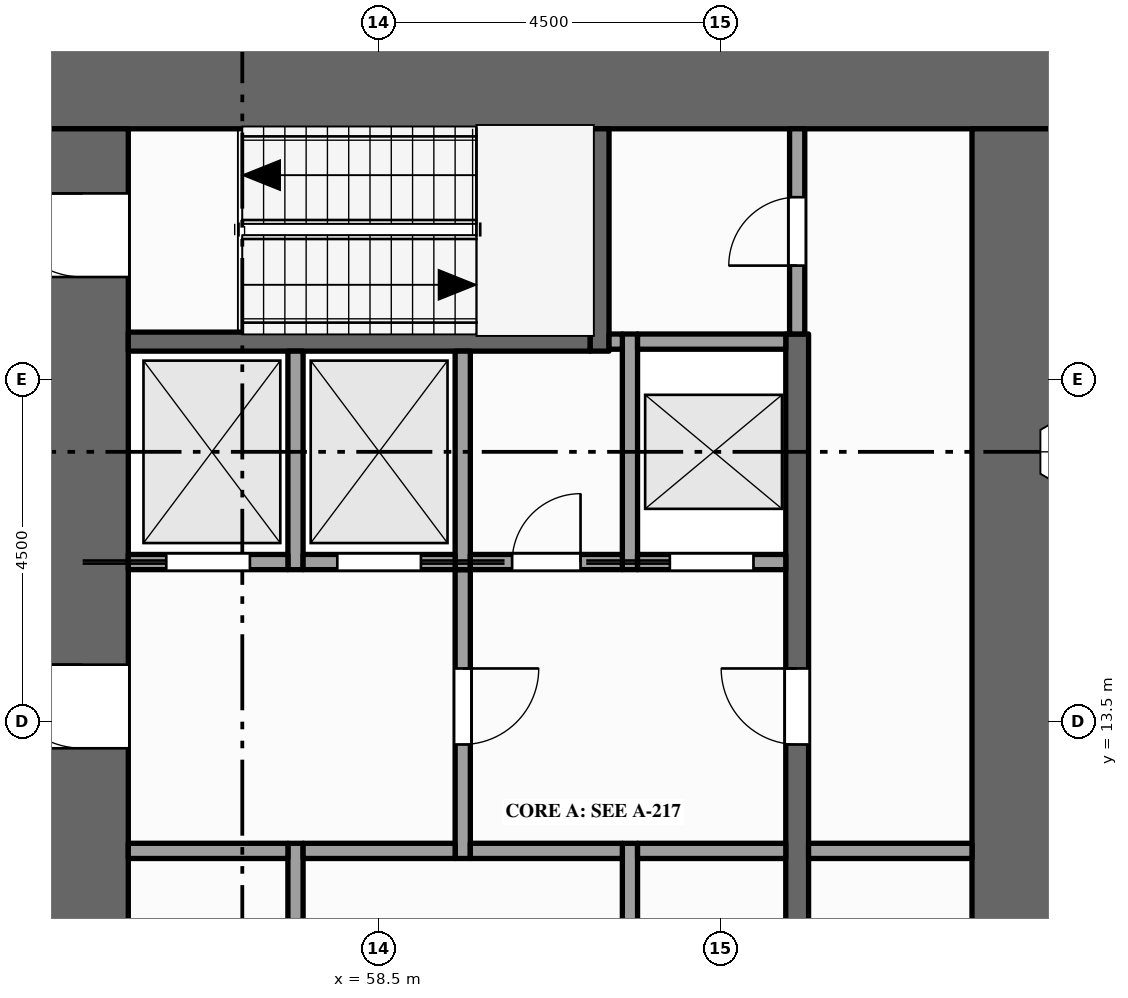
"""IFC4 building model, lengths in metres.
Left out: names, types, materials, properties, quantities, classifications, styles, units other than length and angle.
Written with IfcOpenShell. Run it as: python <this file> out.ifc"""

import sys

from ifc_helpers import new_model, si_unit, direction, frame, frame_2d, origin, place, context, subcontext, project, spatial, rectangle, extrude, element, fill, save


model = new_model("IFC4")
c1 = context("Model", 3, precision=1e-05, world=origin(), true_north=direction((0.0, 1.0)))
c2 = subcontext(c1, "Body", "Model", "MODEL_VIEW")
j1 = project(units=[si_unit("LENGTHUNIT", "METRE"), si_unit("PLANEANGLEUNIT", "RADIAN")], contexts=[c1])
p1 = place(None, origin())
s1 = spatial("IfcSite", under=j1, at=p1, CompositionType="ELEMENT")
p2 = place(p1, origin())
s2 = spatial("IfcBuilding", under=s1, at=p2, CompositionType="ELEMENT")
p3 = place(p2, frame((0.0, 0.0, 95.0)))
s3 = spatial("IfcBuildingStorey", under=s2, at=p3, CompositionType="ELEMENT", Elevation=95.0)
p4 = place(p3, frame((54.0, 21.9, -0.15), z_axis=(0.0, 0.0, 1.0), x_axis=(1.0, 0.0, 0.0)))
e1 = element("IfcWall", 1, at=p4, inside=s3, PredefinedType="SHEAR", context=c2, shape_type="SweptSolid", body=[
    extrude(rectangle(XDim=13.5, YDim=1.2, at=frame_2d((6.75, 0.0))), origin(), (0.0, 0.0, 1.0), 4.0),
])
p5 = place(p3, frame((54.6, 1.2, -0.15), z_axis=(0.0, 0.0, 1.0), x_axis=(0.0, 1.0, 0.0)))
e2 = element("IfcWall", 2, at=p5, inside=s3, PredefinedType="SHEAR", context=c2, shape_type="SweptSolid", body=[
    extrude(rectangle(XDim=20.1, YDim=1.2, at=frame_2d((10.05, 0.0))), origin(), (0.0, 0.0, 1.0), 4.0),
])
p6 = place(p5, frame((5.9, 0.0, 0.15)))
e3 = element("IfcOpeningElement", 3, at=p6, cuts=e2, PredefinedType="OPENING", context=c2, shape_type="SweptSolid", body=[
    extrude(rectangle(XDim=1.8, YDim=2.1, at=frame_2d((0.9, 1.05))), frame((0.0, 0.61, 0.0), z_axis=(0.0, -1.0, 0.0), x_axis=(1.0, 0.0, 0.0)), (0.0, 0.0, 1.0), 1.22),
])
p7 = place(p5, frame((11.95, 0.0, 0.15)))
e4 = element("IfcOpeningElement", 4, at=p7, cuts=e2, PredefinedType="OPENING", context=c2, shape_type="SweptSolid", body=[
    extrude(rectangle(XDim=1.1, YDim=2.1, at=frame_2d((0.55, 1.05))), frame((0.0, 0.61, 0.0), z_axis=(0.0, -1.0, 0.0), x_axis=(1.0, 0.0, 0.0)), (0.0, 0.0, 1.0), 1.22),
])
p8 = place(p5, frame((0.95, 0.0, 0.15)))
e5 = element("IfcOpeningElement", 5, at=p8, cuts=e2, PredefinedType="OPENING", context=c2, shape_type="SweptSolid", body=[
    extrude(rectangle(XDim=1.1, YDim=2.1, at=frame_2d((0.55, 1.05))), frame((0.0, 0.61, 0.0), z_axis=(0.0, -1.0, 0.0), x_axis=(1.0, 0.0, 0.0)), (0.0, 0.0, 1.0), 1.22),
])
p9 = place(p5, frame((18.15, 0.0, 0.15)))
e6 = element("IfcOpeningElement", 6, at=p9, cuts=e2, PredefinedType="OPENING", context=c2, shape_type="SweptSolid", body=[
    extrude(rectangle(XDim=1.1, YDim=2.1, at=frame_2d((0.55, 1.05))), frame((0.0, 0.61, 0.0), z_axis=(0.0, -1.0, 0.0), x_axis=(1.0, 0.0, 0.0)), (0.0, 0.0, 1.0), 1.22),
])
p10 = place(p3, frame((66.9, 1.2, -0.15), z_axis=(0.0, 0.0, 1.0), x_axis=(0.0, 1.0, 0.0)))
e7 = element("IfcWall", 7, at=p10, inside=s3, PredefinedType="SHEAR", context=c2, shape_type="SweptSolid", body=[
    extrude(rectangle(XDim=20.1, YDim=1.2, at=frame_2d((10.05, 0.0))), origin(), (0.0, 0.0, 1.0), 4.0),
])
p11 = place(p3, frame((57.4, 9.3, 0.0), z_axis=(0.0, 0.0, 1.0), x_axis=(0.0, 1.0, 0.0)))
e8 = element("IfcWall", 8, at=p11, inside=s3, PredefinedType="PARTITIONING", context=c2, shape_type="SweptSolid", body=[
    extrude(rectangle(XDim=2.6, YDim=0.2, at=frame_2d((1.3, 0.0))), origin(), (0.0, 0.0, 1.0), 3.85),
])
p12 = place(p3, frame((57.4, 15.5, 0.0), z_axis=(0.0, 0.0, 1.0), x_axis=(0.0, 1.0, 0.0)))
e9 = element("IfcWall", 9, at=p12, inside=s3, PredefinedType="SOLIDWALL", context=c2, shape_type="SweptSolid", body=[
    extrude(rectangle(XDim=2.875, YDim=0.2, at=frame_2d((1.438, 0.0))), origin(), (0.0, 0.0, 1.0), 3.85),
])
p13 = place(p3, frame((59.6, 11.7, 0.0), z_axis=(0.0, 0.0, 1.0), x_axis=(0.0, 1.0, 0.0)))
e10 = element("IfcWall", 10, at=p13, inside=s3, PredefinedType="PARTITIONING", context=c2, shape_type="SweptSolid", body=[
    extrude(rectangle(XDim=3.8, YDim=0.2, at=frame_2d((1.9, 0.0))), origin(), (0.0, 0.0, 1.0), 3.85),
])
p14 = place(p13, frame((1.5, 0.0, 0.0)))
e11 = element("IfcOpeningElement", 11, at=p14, cuts=e10, PredefinedType="OPENING", context=c2, shape_type="SweptSolid", body=[
    extrude(rectangle(XDim=1.0, YDim=2.1, at=frame_2d((0.5, 1.05))), frame((0.0, 0.11, 0.0), z_axis=(0.0, -1.0, 0.0), x_axis=(1.0, 0.0, 0.0)), (0.0, 0.0, 1.0), 0.22),
])
p15 = place(p3, frame((59.6, 15.5, 0.0), z_axis=(0.0, 0.0, 1.0), x_axis=(0.0, 1.0, 0.0)))
e12 = element("IfcWall", 12, at=p15, inside=s3, PredefinedType="SOLIDWALL", context=c2, shape_type="SweptSolid", body=[
    extrude(rectangle(XDim=2.875, YDim=0.2, at=frame_2d((1.438, 0.0))), origin(), (0.0, 0.0, 1.0), 3.85),
])
p16 = place(p3, frame((61.4, 18.375, 0.0), z_axis=(0.0, 0.0, 1.0), x_axis=(0.0, 1.0, 0.0)))
e13 = element("IfcWall", 13, at=p16, inside=s3, PredefinedType="SHEAR", context=c2, shape_type="SweptSolid", body=[
    extrude(rectangle(XDim=2.925, YDim=0.25, at=frame_2d((1.462, 0.0))), origin(), (0.0, 0.0, 1.0), 3.85),
])
p17 = place(p3, frame((61.8, 9.3, 0.0), z_axis=(0.0, 0.0, 1.0), x_axis=(0.0, 1.0, 0.0)))
e14 = element("IfcWall", 14, at=p17, inside=s3, PredefinedType="PARTITIONING", context=c2, shape_type="SweptSolid", body=[
    extrude(rectangle(XDim=2.6, YDim=0.2, at=frame_2d((1.3, 0.0))), origin(), (0.0, 0.0, 1.0), 3.85),
])
p18 = place(p3, frame((61.8, 15.5, 0.0), z_axis=(0.0, 0.0, 1.0), x_axis=(0.0, 1.0, 0.0)))
e15 = element("IfcWall", 15, at=p18, inside=s3, PredefinedType="SOLIDWALL", context=c2, shape_type="SweptSolid", body=[
    extrude(rectangle(XDim=3.1, YDim=0.2, at=frame_2d((1.55, 0.0))), origin(), (0.0, 0.0, 1.0), 3.85),
])
p19 = place(p3, frame((64.0, 4.1, 0.0), z_axis=(0.0, 0.0, 1.0), x_axis=(0.0, 1.0, 0.0)))
e16 = element("IfcWall", 16, at=p19, inside=s3, PredefinedType="SHEAR", context=c2, shape_type="SweptSolid", body=[
    extrude(rectangle(XDim=14.5, YDim=0.3, at=frame_2d((7.25, 0.0))), origin(), (0.0, 0.0, 1.0), 3.85),
])
p20 = place(p19, frame((3.4, 0.0, 0.0)))
e17 = element("IfcOpeningElement", 17, at=p20, cuts=e16, PredefinedType="OPENING", context=c2, shape_type="SweptSolid", body=[
    extrude(rectangle(XDim=1.0, YDim=2.1, at=frame_2d((0.5, 1.05))), frame((0.0, 0.16, 0.0), z_axis=(0.0, -1.0, 0.0), x_axis=(1.0, 0.0, 0.0)), (0.0, 0.0, 1.0), 0.32),
])
p21 = place(p19, frame((9.1, 0.0, 0.0)))
e18 = element("IfcOpeningElement", 18, at=p21, cuts=e16, PredefinedType="OPENING", context=c2, shape_type="SweptSolid", body=[
    extrude(rectangle(XDim=1.0, YDim=2.1, at=frame_2d((0.5, 1.05))), frame((0.0, 0.16, 0.0), z_axis=(0.0, -1.0, 0.0), x_axis=(1.0, 0.0, 0.0)), (0.0, 0.0, 1.0), 0.32),
])
p22 = place(p3, frame((64.0, 18.6, 0.0), z_axis=(0.0, 0.0, 1.0), x_axis=(0.0, 1.0, 0.0)))
e19 = element("IfcWall", 19, at=p22, inside=s3, PredefinedType="PARTITIONING", context=c2, shape_type="SweptSolid", body=[
    extrude(rectangle(XDim=2.7, YDim=0.2, at=frame_2d((1.35, 0.0))), origin(), (0.0, 0.0, 1.0), 3.85),
])
p23 = place(p22, frame((0.9, 0.0, 0.0)))
e20 = element("IfcOpeningElement", 20, at=p23, cuts=e19, PredefinedType="OPENING", context=c2, shape_type="SweptSolid", body=[
    extrude(rectangle(XDim=0.9, YDim=2.1, at=frame_2d((0.45, 1.05))), frame((0.0, 0.11, 0.0), z_axis=(0.0, -1.0, 0.0), x_axis=(1.0, 0.0, 0.0)), (0.0, 0.0, 1.0), 0.22),
])
p24 = place(p3, frame((55.2, 11.8, 0.0), z_axis=(0.0, 0.0, 1.0), x_axis=(1.0, 0.0, 0.0)))
e21 = element("IfcWall", 21, at=p24, inside=s3, PredefinedType="PARTITIONING", context=c2, shape_type="SweptSolid", body=[
    extrude(rectangle(XDim=2.1, YDim=0.2, at=frame_2d((1.05, 0.0))), origin(), (0.0, 0.0, 1.0), 3.85),
])
for number, where, z_axis, x_axis in (
    (22, (57.5, 11.8, 0.0), (0.0, 0.0, 1.0), (1.0, 0.0, 0.0)),
    (23, (59.7, 11.8, 0.0), (0.0, 0.0, 1.0), (1.0, 0.0, 0.0)),
):
    element("IfcWall", number, at=place(p3, frame(where, z_axis=z_axis, x_axis=x_axis)), inside=s3, PredefinedType="PARTITIONING", context=c2, shape_type="SweptSolid", body=[
        extrude(rectangle(XDim=2.0, YDim=0.2, at=frame_2d((1.0, 0.0))), origin(), (0.0, 0.0, 1.0), 3.85),
    ])
p25 = place(p3, frame((61.9, 11.8, 0.0), z_axis=(0.0, 0.0, 1.0), x_axis=(1.0, 0.0, 0.0)))
e24 = element("IfcWall", 24, at=p25, inside=s3, PredefinedType="PARTITIONING", context=c2, shape_type="SweptSolid", body=[
    extrude(rectangle(XDim=1.95, YDim=0.2, at=frame_2d((0.975, 0.0))), origin(), (0.0, 0.0, 1.0), 3.85),
])
p26 = place(p3, frame((64.15, 11.8, 0.0), z_axis=(0.0, 0.0, 1.0), x_axis=(1.0, 0.0, 0.0)))
e25 = element("IfcWall", 25, at=p26, inside=s3, PredefinedType="PARTITIONING", context=c2, shape_type="SweptSolid", body=[
    extrude(rectangle(XDim=2.15, YDim=0.2, at=frame_2d((1.075, 0.0))), origin(), (0.0, 0.0, 1.0), 3.85),
])
p27 = place(p3, frame((55.2, 15.6, 0.0), z_axis=(0.0, 0.0, 1.0), x_axis=(1.0, 0.0, 0.0)))
e26 = element("IfcWall", 26, at=p27, inside=s3, PredefinedType="SOLIDWALL", context=c2, shape_type="SweptSolid", body=[
    extrude(rectangle(XDim=2.1, YDim=0.2, at=frame_2d((1.05, 0.0))), origin(), (0.0, 0.0, 1.0), 3.85),
])
p28 = place(p27, frame((0.5, 0.0, 0.012)))
e27 = element("IfcOpeningElement", 27, at=p28, cuts=e26, PredefinedType="OPENING", context=c2, shape_type="SweptSolid", body=[
    extrude(rectangle(XDim=1.1, YDim=2.1, at=frame_2d((0.55, 1.05))), frame((0.0, 0.11, 0.0), z_axis=(0.0, -1.0, 0.0), x_axis=(1.0, 0.0, 0.0)), (0.0, 0.0, 1.0), 0.22),
])
p29 = place(p3, frame((57.5, 15.6, 0.0), z_axis=(0.0, 0.0, 1.0), x_axis=(1.0, 0.0, 0.0)))
e28 = element("IfcWall", 28, at=p29, inside=s3, PredefinedType="SOLIDWALL", context=c2, shape_type="SweptSolid", body=[
    extrude(rectangle(XDim=2.0, YDim=0.2, at=frame_2d((1.0, 0.0))), origin(), (0.0, 0.0, 1.0), 3.85),
])
p30 = place(p29, frame((0.45, 0.0, 0.012)))
e29 = element("IfcOpeningElement", 29, at=p30, cuts=e28, PredefinedType="OPENING", context=c2, shape_type="SweptSolid", body=[
    extrude(rectangle(XDim=1.1, YDim=2.1, at=frame_2d((0.55, 1.05))), frame((0.0, 0.11, 0.0), z_axis=(0.0, -1.0, 0.0), x_axis=(1.0, 0.0, 0.0)), (0.0, 0.0, 1.0), 0.22),
])
p31 = place(p3, frame((59.7, 15.6, 0.0), z_axis=(0.0, 0.0, 1.0), x_axis=(1.0, 0.0, 0.0)))
e30 = element("IfcWall", 30, at=p31, inside=s3, PredefinedType="PARTITIONING", context=c2, shape_type="SweptSolid", body=[
    extrude(rectangle(XDim=2.0, YDim=0.2, at=frame_2d((1.0, 0.0))), origin(), (0.0, 0.0, 1.0), 3.85),
])
p32 = place(p31, frame((0.55, 0.0, 0.0)))
e31 = element("IfcOpeningElement", 31, at=p32, cuts=e30, PredefinedType="OPENING", context=c2, shape_type="SweptSolid", body=[
    extrude(rectangle(XDim=0.9, YDim=2.1, at=frame_2d((0.45, 1.05))), frame((0.0, 0.11, 0.0), z_axis=(0.0, -1.0, 0.0), x_axis=(1.0, 0.0, 0.0)), (0.0, 0.0, 1.0), 0.22),
])
p33 = place(p3, frame((61.9, 15.6, 0.0), z_axis=(0.0, 0.0, 1.0), x_axis=(1.0, 0.0, 0.0)))
e32 = element("IfcWall", 32, at=p33, inside=s3, PredefinedType="SOLIDWALL", context=c2, shape_type="SweptSolid", body=[
    extrude(rectangle(XDim=1.95, YDim=0.2, at=frame_2d((0.975, 0.0))), origin(), (0.0, 0.0, 1.0), 3.85),
])
p34 = place(p33, frame((0.425, 0.0, 0.012)))
e33 = element("IfcOpeningElement", 33, at=p34, cuts=e32, PredefinedType="OPENING", context=c2, shape_type="SweptSolid", body=[
    extrude(rectangle(XDim=1.1, YDim=2.1, at=frame_2d((0.55, 1.05))), frame((0.0, 0.11, 0.0), z_axis=(0.0, -1.0, 0.0), x_axis=(1.0, 0.0, 0.0)), (0.0, 0.0, 1.0), 0.22),
])
p35 = place(p3, frame((55.2, 18.5, 0.0), z_axis=(0.0, 0.0, 1.0), x_axis=(1.0, 0.0, 0.0)))
e34 = element("IfcWall", 34, at=p35, inside=s3, PredefinedType="SHEAR", context=c2, shape_type="SweptSolid", body=[
    extrude(rectangle(XDim=6.075, YDim=0.25, at=frame_2d((3.038, 0.0))), origin(), (0.0, 0.0, 1.0), 3.85),
])
p36 = place(p3, frame((61.525, 18.5, 0.0), z_axis=(0.0, 0.0, 1.0), x_axis=(1.0, 0.0, 0.0)))
e35 = element("IfcWall", 35, at=p36, inside=s3, PredefinedType="PARTITIONING", context=c2, shape_type="SweptSolid", body=[
    extrude(rectangle(XDim=0.175, YDim=0.2, at=frame_2d((0.087, 0.0))), origin(), (0.0, 0.0, 1.0), 3.85),
])
p37 = place(p3, frame((61.9, 18.5, 0.0), z_axis=(0.0, 0.0, 1.0), x_axis=(1.0, 0.0, 0.0)))
e36 = element("IfcWall", 36, at=p37, inside=s3, PredefinedType="SOLIDWALL", context=c2, shape_type="SweptSolid", body=[
    extrude(rectangle(XDim=1.95, YDim=0.2, at=frame_2d((0.975, 0.0))), origin(), (0.0, 0.0, 1.0), 3.85),
])
p38 = place(p28, origin())
e37 = element("IfcDoor", 37, at=p38, inside=s3, OperationType="SLIDING_TO_LEFT", PredefinedType="DOOR", context=c2, shape_type="SweptSolid", body=[
    extrude(rectangle(XDim=1.1, YDim=2.1, at=frame_2d((0.55, 1.05))), frame((0.0, 0.025, 0.0), z_axis=(0.0, -1.0, 0.0), x_axis=(1.0, 0.0, 0.0)), (0.0, 0.0, 1.0), 0.05),
])
fill(e27, e37)
p39 = place(p30, origin())
e38 = element("IfcDoor", 38, at=p39, inside=s3, OperationType="SLIDING_TO_RIGHT", PredefinedType="DOOR", context=c2, shape_type="SweptSolid", body=[
    extrude(rectangle(XDim=1.1, YDim=2.1, at=frame_2d((0.55, 1.05))), frame((0.0, 0.025, 0.0), z_axis=(0.0, -1.0, 0.0), x_axis=(1.0, 0.0, 0.0)), (0.0, 0.0, 1.0), 0.05),
])
fill(e29, e38)
p40 = place(p34, origin())
e39 = element("IfcDoor", 39, at=p40, inside=s3, OperationType="SLIDING_TO_LEFT", PredefinedType="DOOR", context=c2, shape_type="SweptSolid", body=[
    extrude(rectangle(XDim=1.1, YDim=2.1, at=frame_2d((0.55, 1.05))), frame((0.0, 0.025, 0.0), z_axis=(0.0, -1.0, 0.0), x_axis=(1.0, 0.0, 0.0)), (0.0, 0.0, 1.0), 0.05),
])
fill(e33, e39)
p41 = place(p7, origin())
e40 = element("IfcDoor", 40, at=p41, inside=s3, OperationType="SINGLE_SWING_RIGHT", PredefinedType="DOOR", context=c2, shape_type="SweptSolid", body=[
    extrude(rectangle(XDim=1.1, YDim=2.1, at=frame_2d((0.55, 1.05))), frame((0.0, 0.025, 0.0), z_axis=(0.0, -1.0, 0.0), x_axis=(1.0, 0.0, 0.0)), (0.0, 0.0, 1.0), 0.05),
])
fill(e4, e40)
p42 = place(p14, origin())
e41 = element("IfcDoor", 41, at=p42, inside=s3, OperationType="SINGLE_SWING_RIGHT", PredefinedType="DOOR", context=c2, shape_type="SweptSolid", body=[
    extrude(rectangle(XDim=1.0, YDim=2.1, at=frame_2d((0.5, 1.05))), frame((0.0, 0.025, 0.0), z_axis=(0.0, -1.0, 0.0), x_axis=(1.0, 0.0, 0.0)), (0.0, 0.0, 1.0), 0.05),
])
fill(e11, e41)
p43 = place(p21, origin())
e42 = element("IfcDoor", 42, at=p43, inside=s3, OperationType="SINGLE_SWING_RIGHT", PredefinedType="DOOR", context=c2, shape_type="SweptSolid", body=[
    extrude(rectangle(XDim=1.0, YDim=2.1, at=frame_2d((0.5, 1.05))), frame((0.0, 0.025, 0.0), z_axis=(0.0, -1.0, 0.0), x_axis=(1.0, 0.0, 0.0)), (0.0, 0.0, 1.0), 0.05),
])
fill(e18, e42)
p44 = place(p9, origin())
e43 = element("IfcDoor", 43, at=p44, inside=s3, OperationType="SINGLE_SWING_RIGHT", PredefinedType="DOOR", context=c2, shape_type="SweptSolid", body=[
    extrude(rectangle(XDim=1.1, YDim=2.1, at=frame_2d((0.55, 1.05))), frame((0.0, 0.025, 0.0), z_axis=(0.0, -1.0, 0.0), x_axis=(1.0, 0.0, 0.0)), (0.0, 0.0, 1.0), 0.05),
])
fill(e6, e43)
p45 = place(p23, origin())
e44 = element("IfcDoor", 44, at=p45, inside=s3, OperationType="SINGLE_SWING_LEFT", PredefinedType="DOOR", context=c2, shape_type="SweptSolid", body=[
    extrude(rectangle(XDim=0.9, YDim=2.1, at=frame_2d((0.45, 1.05))), frame((0.0, 0.025, 0.0), z_axis=(0.0, -1.0, 0.0), x_axis=(1.0, 0.0, 0.0)), (0.0, 0.0, 1.0), 0.05),
])
fill(e20, e44)
p46 = place(p32, origin())
e45 = element("IfcDoor", 45, at=p46, inside=s3, OperationType="SINGLE_SWING_RIGHT", PredefinedType="DOOR", context=c2, shape_type="SweptSolid", body=[
    extrude(rectangle(XDim=0.9, YDim=2.1, at=frame_2d((0.45, 1.05))), frame((0.0, 0.025, 0.0), z_axis=(0.0, -1.0, 0.0), x_axis=(1.0, 0.0, 0.0)), (0.0, 0.0, 1.0), 0.05),
])
fill(e31, e45)
save(model, sys.argv[1])
